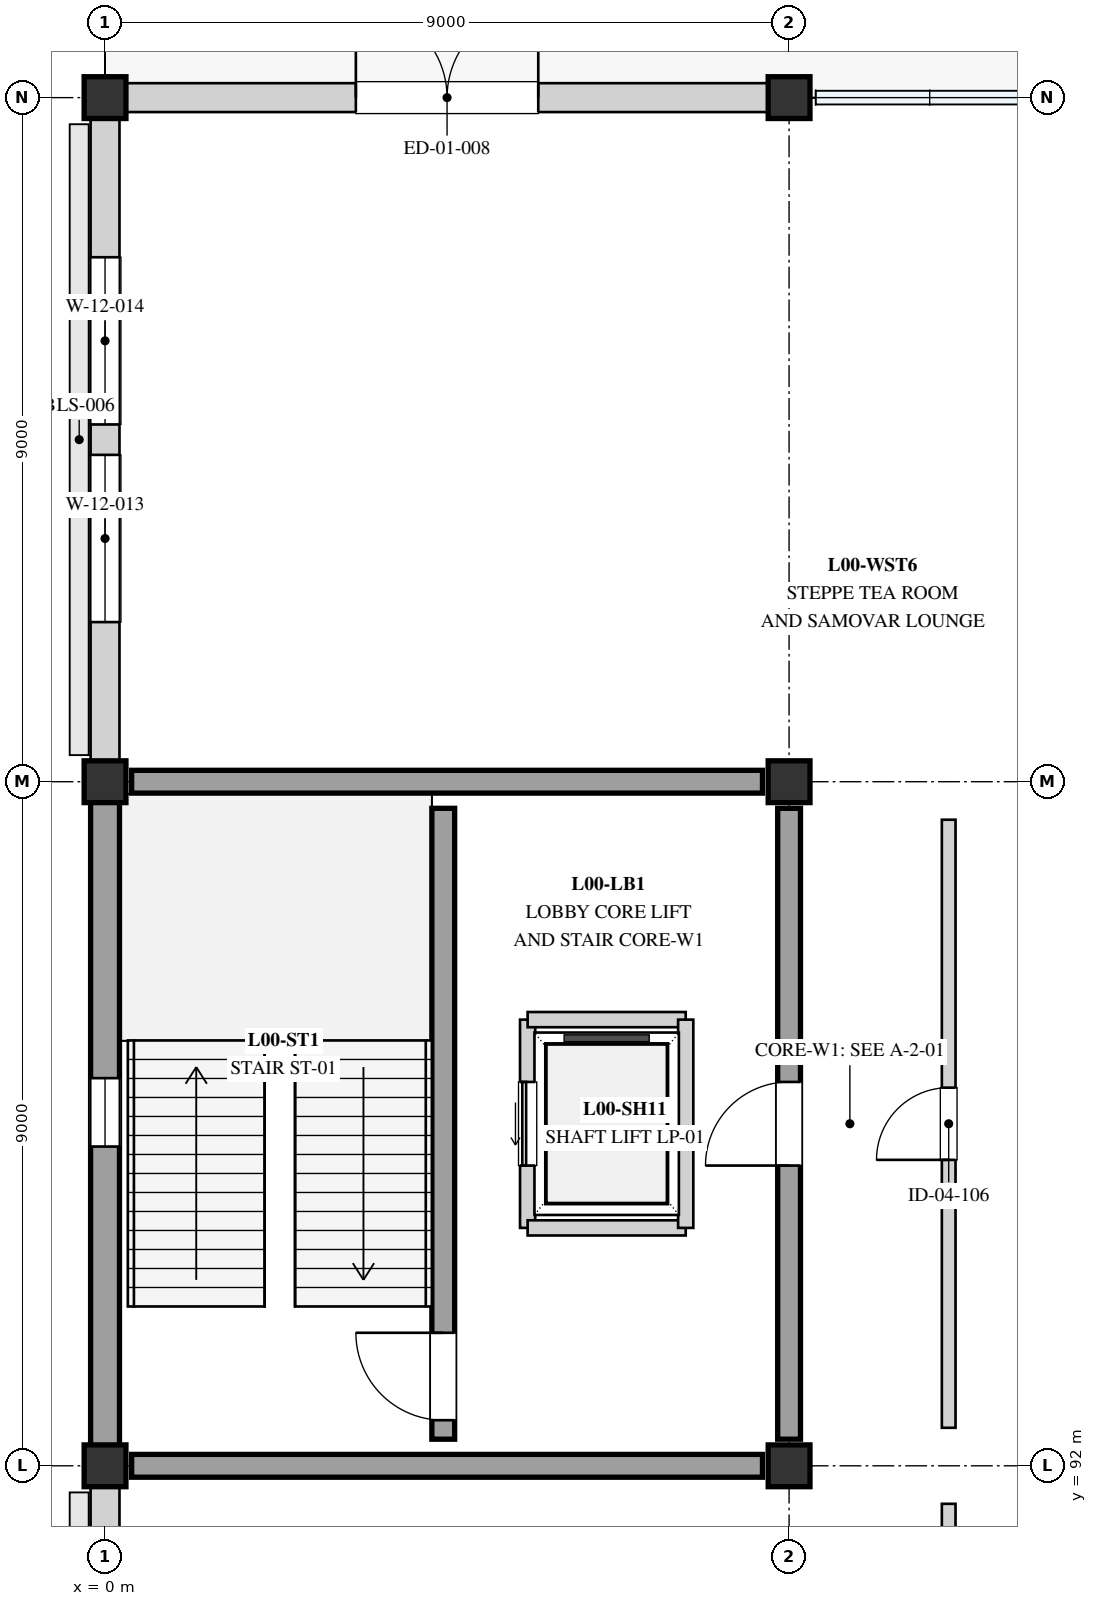
"""IFC4 building model, lengths in metres.
Left out: names, types, materials, properties, quantities, classifications, styles, units other than length and angle.
Written with IfcOpenShell. Run it as: python <this file> out.ifc"""

import sys

from ifc_helpers import new_model, si_unit, direction, frame, frame_2d, origin, origin_2d, place, context, subcontext, project, spatial, rectangle, extrude, element, fill, save


model = new_model("IFC4")
c1 = context("Model", 3, precision=1e-05, world=origin(), true_north=direction((0.0, 1.0)))
c2 = subcontext(c1, "Body", "Model", "MODEL_VIEW")
j1 = project(units=[si_unit("LENGTHUNIT", "METRE"), si_unit("PLANEANGLEUNIT", "RADIAN")], contexts=[c1])
p1 = place(None, origin())
s1 = spatial("IfcSite", under=j1, at=p1, CompositionType="ELEMENT")
p2 = place(p1, origin())
s2 = spatial("IfcBuilding", under=s1, at=p2, CompositionType="ELEMENT")
p3 = place(p2, origin())
s3 = spatial("IfcBuildingStorey", under=s2, at=p3, CompositionType="ELEMENT", Elevation=0.0)
for number, where, z_axis, x_axis in (
    (1, (0.0, 92.0, 0.0), (0.0, 0.0, 1.0), (1.0, 0.0, 0.0)),
    (2, (0.0, 101.0, 0.0), (0.0, 0.0, 1.0), (1.0, 0.0, 0.0)),
    (3, (0.0, 110.0, 0.0), (0.0, 0.0, 1.0), (1.0, 0.0, 0.0)),
    (4, (9.0, 92.0, 0.0), (0.0, 0.0, 1.0), (1.0, 0.0, 0.0)),
    (5, (9.0, 101.0, 0.0), (0.0, 0.0, 1.0), (1.0, 0.0, 0.0)),
    (6, (9.0, 110.0, 0.0), (0.0, 0.0, 1.0), (1.0, 0.0, 0.0)),
):
    element("IfcColumn", number, at=place(p3, frame(where, z_axis=z_axis, x_axis=x_axis)), inside=s3, PredefinedType="COLUMN", context=c2, shape_type="SweptSolid", body=[
        extrude(rectangle(XDim=0.55, YDim=0.55, at=origin_2d()), origin(), (0.0, 0.0, 1.0), 4.5),
    ])
p4 = place(p3, frame((0.0, 83.0, 0.0), z_axis=(0.0, 0.0, 1.0), x_axis=(0.0, 1.0, 0.0)))
e7 = element("IfcWall", 7, at=p4, inside=s3, PredefinedType="STANDARD", context=c2, shape_type="SweptSolid", body=[
    extrude(rectangle(XDim=9.0, YDim=0.38, at=frame_2d((4.5, 0.0))), origin(), (0.0, 0.0, 1.0), 3.35),
])
p5 = place(p4, frame((2.1, 0.0, 0.95)))
e8 = element("IfcOpeningElement", 8, at=p5, cuts=e7, PredefinedType="OPENING", context=c2, shape_type="SweptSolid", body=[
    extrude(rectangle(XDim=1.6, YDim=2.1, at=frame_2d((0.8, 1.05))), frame((0.0, 0.2, 0.0), z_axis=(0.0, -1.0, 0.0), x_axis=(1.0, 0.0, 0.0)), (0.0, 0.0, 1.0), 0.4),
])
p6 = place(p4, frame((5.3, 0.0, 0.95)))
e9 = element("IfcOpeningElement", 9, at=p6, cuts=e7, PredefinedType="OPENING", context=c2, shape_type="SweptSolid", body=[
    extrude(rectangle(XDim=1.6, YDim=2.1, at=frame_2d((0.8, 1.05))), frame((0.0, 0.2, 0.0), z_axis=(0.0, -1.0, 0.0), x_axis=(1.0, 0.0, 0.0)), (0.0, 0.0, 1.0), 0.4),
])
p7 = place(p3, frame((0.0, 92.0, 0.0), z_axis=(0.0, 0.0, 1.0), x_axis=(0.0, 1.0, 0.0)))
e10 = element("IfcWall", 10, at=p7, inside=s3, PredefinedType="STANDARD", context=c2, shape_type="SweptSolid", body=[
    extrude(rectangle(XDim=9.0, YDim=0.38, at=frame_2d((4.5, 0.0))), origin(), (0.0, 0.0, 1.0), 4.22),
])
p8 = place(p7, frame((4.2, 0.0, 0.76)))
e11 = element("IfcOpeningElement", 11, at=p8, cuts=e10, PredefinedType="OPENING", context=c2, shape_type="SweptSolid", body=[
    extrude(rectangle(XDim=0.9, YDim=2.4, at=frame_2d((0.45, 1.2))), frame((0.0, 0.2, 0.0), z_axis=(0.0, -1.0, 0.0), x_axis=(1.0, 0.0, 0.0)), (0.0, 0.0, 1.0), 0.4),
])
p9 = place(p3, frame((0.0, 101.0, 0.0), z_axis=(0.0, 0.0, 1.0), x_axis=(0.0, 1.0, 0.0)))
e12 = element("IfcWall", 12, at=p9, inside=s3, PredefinedType="STANDARD", context=c2, shape_type="SweptSolid", body=[
    extrude(rectangle(XDim=9.0, YDim=0.38, at=frame_2d((4.5, 0.0))), origin(), (0.0, 0.0, 1.0), 3.35),
])
p10 = place(p9, frame((2.1, 0.0, 0.95)))
e13 = element("IfcOpeningElement", 13, at=p10, cuts=e12, PredefinedType="OPENING", context=c2, shape_type="SweptSolid", body=[
    extrude(rectangle(XDim=2.2, YDim=2.1, at=frame_2d((1.1, 1.05))), frame((0.0, 0.2, 0.0), z_axis=(0.0, -1.0, 0.0), x_axis=(1.0, 0.0, 0.0)), (0.0, 0.0, 1.0), 0.4),
])
p11 = place(p9, frame((4.7, 0.0, 0.95)))
e14 = element("IfcOpeningElement", 14, at=p11, cuts=e12, PredefinedType="OPENING", context=c2, shape_type="SweptSolid", body=[
    extrude(rectangle(XDim=2.2, YDim=2.1, at=frame_2d((1.1, 1.05))), frame((0.0, 0.2, 0.0), z_axis=(0.0, -1.0, 0.0), x_axis=(1.0, 0.0, 0.0)), (0.0, 0.0, 1.0), 0.4),
])
p12 = place(p3, frame((0.0, 110.0, 0.0), z_axis=(0.0, 0.0, 1.0), x_axis=(1.0, 0.0, 0.0)))
e15 = element("IfcWall", 15, at=p12, inside=s3, PredefinedType="STANDARD", context=c2, shape_type="SweptSolid", body=[
    extrude(rectangle(XDim=9.0, YDim=0.38, at=frame_2d((4.5, 0.0))), origin(), (0.0, 0.0, 1.0), 3.35),
])
p13 = place(p12, frame((3.3, 0.0, 0.0)))
e16 = element("IfcOpeningElement", 16, at=p13, cuts=e15, PredefinedType="OPENING", context=c2, shape_type="SweptSolid", body=[
    extrude(rectangle(XDim=2.4, YDim=2.6, at=frame_2d((1.2, 1.3))), frame((0.0, 0.2, 0.0), z_axis=(0.0, -1.0, 0.0), x_axis=(1.0, 0.0, 0.0)), (0.0, 0.0, 1.0), 0.4),
])
p14 = place(p3, frame((4.45, 92.35, 0.0), z_axis=(0.0, 0.0, 1.0), x_axis=(0.0, 1.0, 0.0)))
e17 = element("IfcWall", 17, at=p14, inside=s3, PredefinedType="SHEAR", context=c2, shape_type="SweptSolid", body=[
    extrude(rectangle(XDim=8.3, YDim=0.3, at=frame_2d((4.15, 0.0))), origin(), (0.0, 0.0, 1.0), 4.22),
])
p15 = place(p14, frame((0.25, 0.0, 0.0)))
e18 = element("IfcOpeningElement", 18, at=p15, cuts=e17, PredefinedType="OPENING", context=c2, shape_type="SweptSolid", body=[
    extrude(rectangle(XDim=1.15, YDim=2.15, at=frame_2d((0.575, 1.075))), frame((0.0, 0.16, 0.0), z_axis=(0.0, -1.0, 0.0), x_axis=(1.0, 0.0, 0.0)), (0.0, 0.0, 1.0), 0.32),
])
p16 = place(p3, frame((9.0, 92.35, 0.0), z_axis=(0.0, 0.0, 1.0), x_axis=(0.0, 1.0, 0.0)))
e19 = element("IfcWall", 19, at=p16, inside=s3, PredefinedType="SHEAR", context=c2, shape_type="SweptSolid", body=[
    extrude(rectangle(XDim=8.3, YDim=0.3, at=frame_2d((4.15, 0.0))), origin(), (0.0, 0.0, 1.0), 4.22),
])
p17 = place(p16, frame((3.6, 0.0, 0.0)))
e20 = element("IfcOpeningElement", 20, at=p17, cuts=e19, PredefinedType="OPENING", context=c2, shape_type="SweptSolid", body=[
    extrude(rectangle(XDim=1.1, YDim=2.1, at=frame_2d((0.55, 1.05))), frame((0.0, 0.16, 0.0), z_axis=(0.0, -1.0, 0.0), x_axis=(1.0, 0.0, 0.0)), (0.0, 0.0, 1.0), 0.32),
])
for number, where, z_axis, x_axis in (
    (21, (0.35, 92.0, 0.0), (0.0, 0.0, 1.0), (1.0, 0.0, 0.0)),
    (22, (0.35, 101.0, 0.0), (0.0, 0.0, 1.0), (1.0, 0.0, 0.0)),
):
    element("IfcWall", number, at=place(p3, frame(where, z_axis=z_axis, x_axis=x_axis)), inside=s3, PredefinedType="SHEAR", context=c2, shape_type="SweptSolid", body=[
        extrude(rectangle(XDim=8.3, YDim=0.3, at=frame_2d((4.15, 0.0))), origin(), (0.0, 0.0, 1.0), 4.22),
    ])
p18 = place(p3, frame((5.56, 95.13, 0.0), z_axis=(0.0, 0.0, 1.0), x_axis=(0.0, 1.0, 0.0)))
e23 = element("IfcWall", 23, at=p18, inside=s3, PredefinedType="SOLIDWALL", context=c2, shape_type="SweptSolid", body=[
    extrude(rectangle(XDim=2.74, YDim=0.2, at=frame_2d((1.37, 0.0))), origin(), (0.0, 0.0, 1.0), 3.2),
])
p19 = place(p18, frame((0.82, 0.0, 0.0)))
e24 = element("IfcOpeningElement", 24, at=p19, cuts=e23, PredefinedType="OPENING", context=c2, shape_type="SweptSolid", body=[
    extrude(rectangle(XDim=1.1, YDim=2.1, at=frame_2d((0.55, 1.05))), frame((0.0, 0.11, 0.0), z_axis=(0.0, -1.0, 0.0), x_axis=(1.0, 0.0, 0.0)), (0.0, 0.0, 1.0), 0.22),
])
for number, where, z_axis, x_axis in (
    (25, (5.56, 95.13, 0.0), (0.0, 0.0, 1.0), (1.0, 0.0, 0.0)),
    (26, (5.56, 97.87, 0.0), (0.0, 0.0, 1.0), (1.0, 0.0, 0.0)),
):
    element("IfcWall", number, at=place(p3, frame(where, z_axis=z_axis, x_axis=x_axis)), inside=s3, PredefinedType="SOLIDWALL", context=c2, shape_type="SweptSolid", body=[
        extrude(rectangle(XDim=2.08, YDim=0.2, at=frame_2d((1.04, 0.0))), origin(), (0.0, 0.0, 1.0), 3.2),
    ])
p20 = place(p3, frame((7.64, 95.13, 0.0), z_axis=(0.0, 0.0, 1.0), x_axis=(0.0, 1.0, 0.0)))
e27 = element("IfcWall", 27, at=p20, inside=s3, PredefinedType="SOLIDWALL", context=c2, shape_type="SweptSolid", body=[
    extrude(rectangle(XDim=2.74, YDim=0.2, at=frame_2d((1.37, 0.0))), origin(), (0.0, 0.0, 1.0), 3.2),
])
p21 = place(p3, frame((11.1, 83.5, 0.0), z_axis=(0.0, 0.0, 1.0), x_axis=(0.0, 1.0, 0.0)))
e28 = element("IfcWall", 28, at=p21, inside=s3, PredefinedType="STANDARD", context=c2, shape_type="SweptSolid", body=[
    extrude(rectangle(XDim=8.0, YDim=0.18, at=frame_2d((4.0, 0.0))), origin(), (0.0, 0.0, 1.0), 3.2),
])
p22 = place(p21, frame((3.5, 0.0, 0.0)))
e29 = element("IfcOpeningElement", 29, at=p22, cuts=e28, PredefinedType="OPENING", context=c2, shape_type="SweptSolid", body=[
    extrude(rectangle(XDim=1.0, YDim=2.1, at=frame_2d((0.5, 1.05))), frame((0.0, 0.1, 0.0), z_axis=(0.0, -1.0, 0.0), x_axis=(1.0, 0.0, 0.0)), (0.0, 0.0, 1.0), 0.2),
])
p23 = place(p3, frame((11.1, 92.5, 0.0), z_axis=(0.0, 0.0, 1.0), x_axis=(0.0, 1.0, 0.0)))
e30 = element("IfcWall", 30, at=p23, inside=s3, PredefinedType="STANDARD", context=c2, shape_type="SweptSolid", body=[
    extrude(rectangle(XDim=8.0, YDim=0.18, at=frame_2d((4.0, 0.0))), origin(), (0.0, 0.0, 1.0), 3.2),
])
p24 = place(p23, frame((3.525, 0.0, 0.0)))
e31 = element("IfcOpeningElement", 31, at=p24, cuts=e30, PredefinedType="OPENING", context=c2, shape_type="SweptSolid", body=[
    extrude(rectangle(XDim=0.95, YDim=2.1, at=frame_2d((0.475, 1.05))), frame((0.0, 0.1, 0.0), z_axis=(0.0, -1.0, 0.0), x_axis=(1.0, 0.0, 0.0)), (0.0, 0.0, 1.0), 0.2),
])
p25 = place(p8, origin())
e32 = element("IfcWindow", 32, at=p25, inside=s3, PartitioningType="SINGLE_PANEL", PredefinedType="WINDOW", context=c2, shape_type="SweptSolid", body=[
    extrude(rectangle(XDim=0.9, YDim=2.4, at=frame_2d((0.45, 1.2))), frame((0.0, 0.03, 0.0), z_axis=(0.0, -1.0, 0.0), x_axis=(1.0, 0.0, 0.0)), (0.0, 0.0, 1.0), 0.06),
])
fill(e11, e32)
p26 = place(p10, origin())
e33 = element("IfcWindow", 33, at=p26, inside=s3, PartitioningType="SINGLE_PANEL", PredefinedType="WINDOW", context=c2, shape_type="SweptSolid", body=[
    extrude(rectangle(XDim=2.2, YDim=2.1, at=frame_2d((1.1, 1.05))), frame((0.0, 0.03, 0.0), z_axis=(0.0, -1.0, 0.0), x_axis=(1.0, 0.0, 0.0)), (0.0, 0.0, 1.0), 0.06),
])
fill(e13, e33)
p27 = place(p11, origin())
e34 = element("IfcWindow", 34, at=p27, inside=s3, PartitioningType="SINGLE_PANEL", PredefinedType="WINDOW", context=c2, shape_type="SweptSolid", body=[
    extrude(rectangle(XDim=2.2, YDim=2.1, at=frame_2d((1.1, 1.05))), frame((0.0, 0.03, 0.0), z_axis=(0.0, -1.0, 0.0), x_axis=(1.0, 0.0, 0.0)), (0.0, 0.0, 1.0), 0.06),
])
fill(e14, e34)
p28 = place(p13, origin())
e35 = element("IfcDoor", 35, at=p28, inside=s3, OperationType="DOUBLE_DOOR_SINGLE_SWING", PredefinedType="DOOR", context=c2, shape_type="SweptSolid", body=[
    extrude(rectangle(XDim=2.4, YDim=2.6, at=frame_2d((1.2, 1.3))), frame((0.0, 0.025, 0.0), z_axis=(0.0, -1.0, 0.0), x_axis=(1.0, 0.0, 0.0)), (0.0, 0.0, 1.0), 0.05),
])
fill(e16, e35)
p29 = place(p15, origin())
e36 = element("IfcDoor", 36, at=p29, inside=s3, OperationType="SINGLE_SWING_RIGHT", PredefinedType="DOOR", context=c2, shape_type="SweptSolid", body=[
    extrude(rectangle(XDim=1.15, YDim=2.15, at=frame_2d((0.575, 1.075))), frame((0.0, 0.025, 0.0), z_axis=(0.0, -1.0, 0.0), x_axis=(1.0, 0.0, 0.0)), (0.0, 0.0, 1.0), 0.05),
])
fill(e18, e36)
p30 = place(p17, origin())
e37 = element("IfcDoor", 37, at=p30, inside=s3, OperationType="SINGLE_SWING_LEFT", PredefinedType="DOOR", context=c2, shape_type="SweptSolid", body=[
    extrude(rectangle(XDim=1.1, YDim=2.1, at=frame_2d((0.55, 1.05))), frame((0.0, 0.025, 0.0), z_axis=(0.0, -1.0, 0.0), x_axis=(1.0, 0.0, 0.0)), (0.0, 0.0, 1.0), 0.05),
])
fill(e20, e37)
p31 = place(p19, origin())
e38 = element("IfcDoor", 38, at=p31, inside=s3, OperationType="SLIDING_TO_LEFT", PredefinedType="DOOR", context=c2, shape_type="SweptSolid", body=[
    extrude(rectangle(XDim=1.1, YDim=2.1, at=frame_2d((0.55, 1.05))), frame((0.0, 0.025, 0.0), z_axis=(0.0, -1.0, 0.0), x_axis=(1.0, 0.0, 0.0)), (0.0, 0.0, 1.0), 0.05),
])
fill(e24, e38)
p32 = place(p24, origin())
e39 = element("IfcDoor", 39, at=p32, inside=s3, OperationType="SINGLE_SWING_LEFT", PredefinedType="DOOR", context=c2, shape_type="SweptSolid", body=[
    extrude(rectangle(XDim=0.95, YDim=2.1, at=frame_2d((0.475, 1.05))), frame((0.0, 0.025, 0.0), z_axis=(0.0, -1.0, 0.0), x_axis=(1.0, 0.0, 0.0)), (0.0, 0.0, 1.0), 0.05),
])
fill(e31, e39)
save(model, sys.argv[1])
